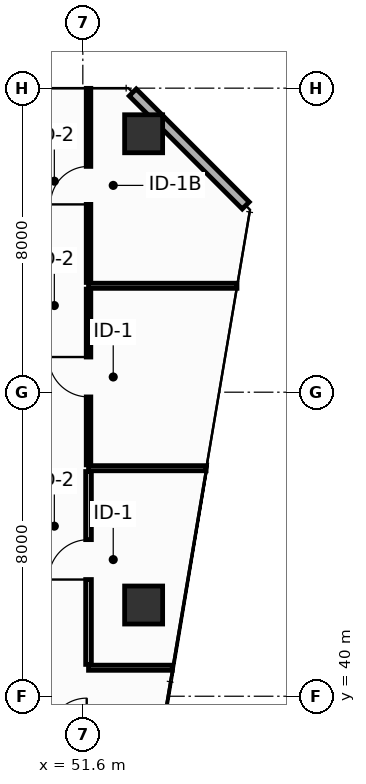
"""IFC4 building model, lengths in metres.
Left out: names, types, materials, properties, quantities, classifications, styles, units other than length and angle.
Written with IfcOpenShell. Run it as: python <this file> out.ifc"""

import sys

from ifc_helpers import new_model, si_unit, direction, frame, frame_2d, origin, origin_2d, place, context, subcontext, project, spatial, rectangle, hollow_rectangle, extrude, element, fill, save


model = new_model("IFC4")
c1 = context("Model", 3, precision=1e-05, world=origin(), true_north=direction((0.0, 1.0)))
c2 = subcontext(c1, "Body", "Model", "MODEL_VIEW")
j1 = project(units=[si_unit("LENGTHUNIT", "METRE"), si_unit("PLANEANGLEUNIT", "RADIAN")], contexts=[c1])
p1 = place(None, origin())
s1 = spatial("IfcSite", under=j1, at=p1, CompositionType="ELEMENT")
p2 = place(p1, origin())
s2 = spatial("IfcBuilding", under=s1, at=p2, CompositionType="ELEMENT")
p3 = place(p2, frame((0.0, 0.0, 167.6)))
s3 = spatial("IfcBuildingStorey", under=s2, at=p3, CompositionType="ELEMENT", Elevation=167.6)
for number, where, z_axis, x_axis in (
    (1, (53.2, 54.8, 0.0), (0.0, 0.0, 1.0), (1.0, 0.0, 0.0)),
    (2, (53.2, 42.4, 0.0), (0.0, 0.0, 1.0), (1.0, 0.0, 0.0)),
):
    element("IfcColumn", number, at=place(p3, frame(where, z_axis=z_axis, x_axis=x_axis)), inside=s3, PredefinedType="COLUMN", context=c2, shape_type="SweptSolid", body=[
        extrude(hollow_rectangle(XDim=1.0, YDim=1.0, WallThickness=0.045, at=origin_2d()), origin(), (0.0, 0.0, 1.0), 3.8),
    ])
p4 = place(p3, frame((55.887, 52.913, 0.0), z_axis=(0.0, 0.0, 1.0), x_axis=(-0.707106781187, 0.707106781187, 0.0)))
e3 = element("IfcWall", 3, at=p4, inside=s3, PredefinedType="STANDARD", context=c2, shape_type="SweptSolid", body=[
    extrude(rectangle(XDim=4.206, YDim=0.26, at=frame_2d((2.103, 0.0))), origin(), (0.0, 0.0, 1.0), 3.55),
])
p5 = place(p3, frame((51.75, 40.75, 0.0), z_axis=(0.0, 0.0, 1.0), x_axis=(1.0, 0.0, 0.0)))
e4 = element("IfcWall", 4, at=p5, inside=s3, PredefinedType="PARTITIONING", context=c2, shape_type="SweptSolid", body=[
    extrude(rectangle(XDim=2.205, YDim=0.135, at=frame_2d((1.103, 0.0))), origin(), (0.0, 0.0, 1.0), 3.035),
])
p6 = place(p3, frame((51.75, 46.0, 0.0), z_axis=(0.0, 0.0, 1.0), x_axis=(1.0, 0.0, 0.0)))
e5 = element("IfcWall", 5, at=p6, inside=s3, PredefinedType="PARTITIONING", context=c2, shape_type="SweptSolid", body=[
    extrude(rectangle(XDim=3.094, YDim=0.135, at=frame_2d((1.547, 0.0))), origin(), (0.0, 0.0, 1.0), 2.835),
])
p7 = place(p3, frame((51.75, 50.8, 0.0), z_axis=(0.0, 0.0, 1.0), x_axis=(1.0, 0.0, 0.0)))
e6 = element("IfcWall", 6, at=p7, inside=s3, PredefinedType="PARTITIONING", context=c2, shape_type="SweptSolid", body=[
    extrude(rectangle(XDim=3.906, YDim=0.135, at=frame_2d((1.953, 0.0))), origin(), (0.0, 0.0, 1.0), 2.835),
])
p8 = place(p3, frame((51.75, 40.837, 0.0), z_axis=(0.0, 0.0, 1.0), x_axis=(0.0, 1.0, 0.0)))
e7 = element("IfcWall", 7, at=p8, inside=s3, PredefinedType="PARTITIONING", context=c2, shape_type="SweptSolid", body=[
    extrude(rectangle(XDim=5.075, YDim=0.15, at=frame_2d((2.538, 0.0))), origin(), (0.0, 0.0, 1.0), 2.835),
])
p9 = place(p8, frame((2.233, 0.0, 0.0)))
e8 = element("IfcOpeningElement", 8, at=p9, cuts=e7, PredefinedType="OPENING", context=c2, shape_type="SweptSolid", body=[
    extrude(rectangle(XDim=1.05, YDim=2.15, at=frame_2d((0.525, 1.075))), frame((0.0, 0.085, 0.0), z_axis=(0.0, -1.0, 0.0), x_axis=(1.0, 0.0, 0.0)), (0.0, 0.0, 1.0), 0.17),
])
p10 = place(p3, frame((51.75, 46.087, 0.0), z_axis=(0.0, 0.0, 1.0), x_axis=(0.0, 1.0, 0.0)))
e9 = element("IfcWall", 9, at=p10, inside=s3, PredefinedType="PARTITIONING", context=c2, shape_type="SweptSolid", body=[
    extrude(rectangle(XDim=4.625, YDim=0.12, at=frame_2d((2.312, 0.0))), origin(), (0.0, 0.0, 1.0), 3.55),
])
p11 = place(p10, frame((1.788, 0.0, 0.0)))
e10 = element("IfcOpeningElement", 10, at=p11, cuts=e9, PredefinedType="OPENING", context=c2, shape_type="SweptSolid", body=[
    extrude(rectangle(XDim=1.05, YDim=2.15, at=frame_2d((0.525, 1.075))), frame((0.0, 0.07, 0.0), z_axis=(0.0, -1.0, 0.0), x_axis=(1.0, 0.0, 0.0)), (0.0, 0.0, 1.0), 0.14),
])
p12 = place(p3, frame((51.75, 50.887, 0.0), z_axis=(0.0, 0.0, 1.0), x_axis=(0.0, 1.0, 0.0)))
e11 = element("IfcWall", 11, at=p12, inside=s3, PredefinedType="PARTITIONING", context=c2, shape_type="SweptSolid", body=[
    extrude(rectangle(XDim=5.108, YDim=0.12, at=frame_2d((2.554, 0.0))), origin(), (0.0, 0.0, 1.0), 2.935),
])
p13 = place(p12, frame((2.054, 0.0, 0.0)))
e12 = element("IfcOpeningElement", 12, at=p13, cuts=e11, PredefinedType="OPENING", context=c2, shape_type="SweptSolid", body=[
    extrude(rectangle(XDim=1.0, YDim=2.15, at=frame_2d((0.5, 1.075))), frame((0.0, 0.07, 0.0), z_axis=(0.0, -1.0, 0.0), x_axis=(1.0, 0.0, 0.0)), (0.0, 0.0, 1.0), 0.14),
])
p14 = place(p9, origin())
e13 = element("IfcDoor", 13, at=p14, inside=s3, OperationType="SINGLE_SWING_LEFT", PredefinedType="DOOR", context=c2, shape_type="SweptSolid", body=[
    extrude(rectangle(XDim=1.05, YDim=2.15, at=frame_2d((0.525, 1.075))), frame((0.0, 0.025, 0.0), z_axis=(0.0, -1.0, 0.0), x_axis=(1.0, 0.0, 0.0)), (0.0, 0.0, 1.0), 0.05),
])
fill(e8, e13)
p15 = place(p11, origin())
e14 = element("IfcDoor", 14, at=p15, inside=s3, OperationType="SINGLE_SWING_RIGHT", PredefinedType="DOOR", context=c2, shape_type="SweptSolid", body=[
    extrude(rectangle(XDim=1.05, YDim=2.15, at=frame_2d((0.525, 1.075))), frame((0.0, 0.025, 0.0), z_axis=(0.0, -1.0, 0.0), x_axis=(1.0, 0.0, 0.0)), (0.0, 0.0, 1.0), 0.05),
])
fill(e10, e14)
p16 = place(p13, origin())
e15 = element("IfcDoor", 15, at=p16, inside=s3, OperationType="SINGLE_SWING_LEFT", PredefinedType="DOOR", context=c2, shape_type="SweptSolid", body=[
    extrude(rectangle(XDim=1.0, YDim=2.15, at=frame_2d((0.5, 1.075))), frame((0.0, 0.025, 0.0), z_axis=(0.0, -1.0, 0.0), x_axis=(1.0, 0.0, 0.0)), (0.0, 0.0, 1.0), 0.05),
])
fill(e12, e15)
save(model, sys.argv[1])
